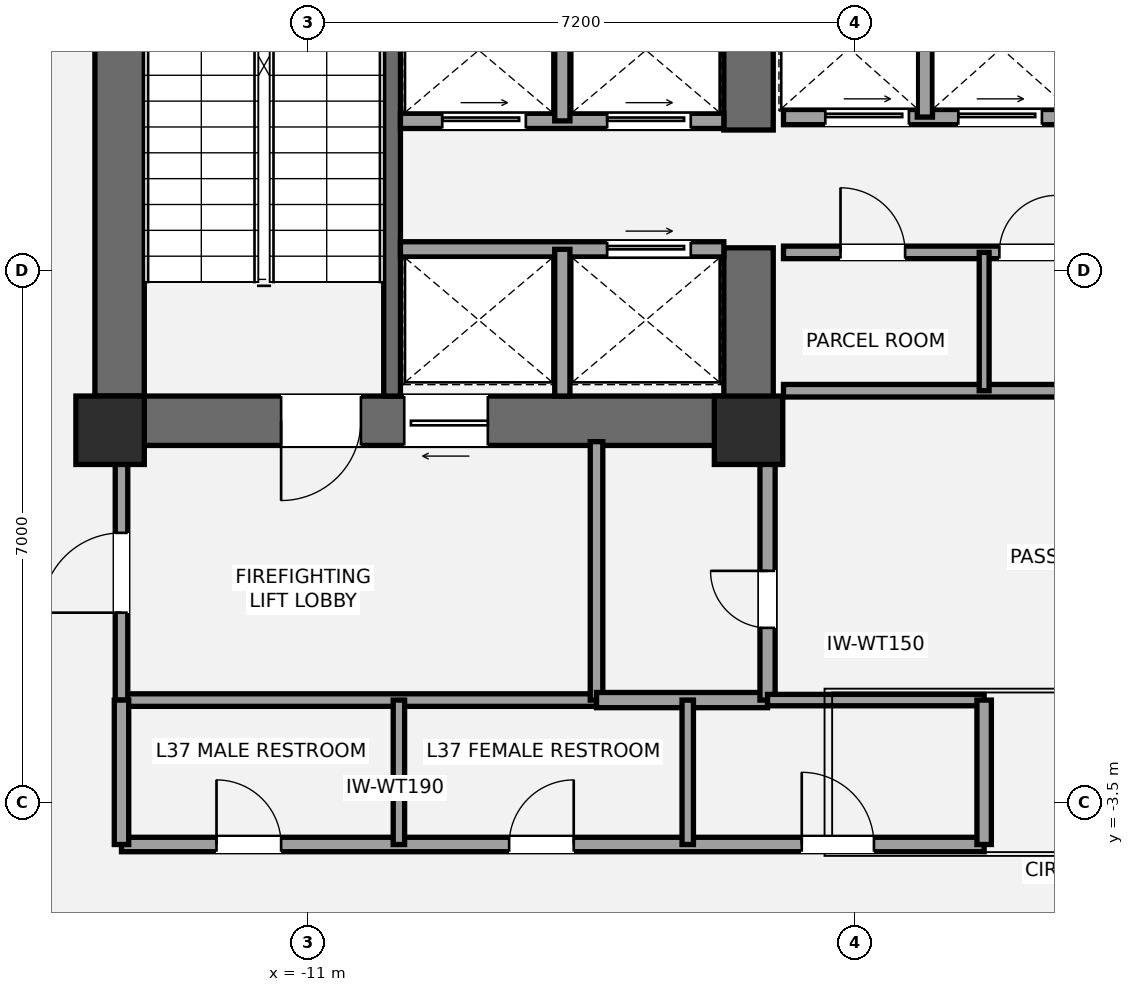
"""IFC4 building model, lengths in metres.
Left out: names, types, materials, properties, quantities, classifications, styles, units other than length and angle.
Written with IfcOpenShell. Run it as: python <this file> out.ifc"""

import sys

from ifc_helpers import new_model, si_unit, direction, frame, frame_2d, origin, origin_2d, place, context, subcontext, project, spatial, rectangle, extrude, element, fill, save


model = new_model("IFC4")
c1 = context("Model", 3, precision=1e-05, world=origin(), true_north=direction((0.0, 1.0)))
c2 = subcontext(c1, "Body", "Model", "MODEL_VIEW")
j1 = project(units=[si_unit("LENGTHUNIT", "METRE"), si_unit("PLANEANGLEUNIT", "RADIAN")], contexts=[c1])
p1 = place(None, origin())
s1 = spatial("IfcSite", under=j1, at=p1, CompositionType="ELEMENT")
p2 = place(p1, origin())
s2 = spatial("IfcBuilding", under=s1, at=p2, CompositionType="ELEMENT")
p3 = place(p2, frame((0.0, 0.0, 139.6)))
s3 = spatial("IfcBuildingStorey", under=s2, at=p3, CompositionType="ELEMENT", Elevation=139.6)
p4 = place(p3, frame((-13.475, 1.2, 0.0), z_axis=(0.0, 0.0, 1.0), x_axis=(0.0, 1.0, 0.0)))
e1 = element("IfcWall", 1, at=p4, inside=s3, PredefinedType="SHEAR", context=c2, shape_type="SweptSolid", body=[
    extrude(rectangle(XDim=8.45, YDim=0.65, at=frame_2d((4.225, 0.0))), origin(), (0.0, 0.0, 1.0), 4.2),
])
p5 = place(p3, frame((-4.875, 1.525, 0.0), z_axis=(0.0, 0.0, 1.0), x_axis=(-1.0, 0.0, 0.0)))
e2 = element("IfcWall", 2, at=p5, inside=s3, PredefinedType="SHEAR", context=c2, shape_type="SweptSolid", body=[
    extrude(rectangle(XDim=8.925, YDim=0.65, at=frame_2d((4.462, 0.0))), origin(), (0.0, 0.0, 1.0), 4.2),
])
p6 = place(p5, frame((5.425, 0.0, 0.0)))
e3 = element("IfcOpeningElement", 3, at=p6, cuts=e2, PredefinedType="OPENING", context=c2, shape_type="SweptSolid", body=[
    extrude(rectangle(XDim=1.05, YDim=2.15, at=frame_2d((0.525, 1.075))), frame((0.0, 0.335, 0.0), z_axis=(0.0, -1.0, 0.0), x_axis=(1.0, 0.0, 0.0)), (0.0, 0.0, 1.0), 0.67),
])
p7 = place(p5, frame((3.755, 0.0, 0.0)))
e4 = element("IfcOpeningElement", 4, at=p7, cuts=e2, PredefinedType="OPENING", context=c2, shape_type="SweptSolid", body=[
    extrude(rectangle(XDim=1.1, YDim=2.2, at=frame_2d((0.55, 1.1))), frame((0.0, 0.335, 0.0), z_axis=(0.0, -1.0, 0.0), x_axis=(1.0, 0.0, 0.0)), (0.0, 0.0, 1.0), 0.67),
])
p8 = place(p3, frame((-5.2, 1.2, 0.0), z_axis=(0.0, 0.0, 1.0), x_axis=(0.0, 1.0, 0.0)))
e5 = element("IfcWall", 5, at=p8, inside=s3, PredefinedType="SHEAR", context=c2, shape_type="SweptSolid", body=[
    extrude(rectangle(XDim=2.6, YDim=0.65, at=frame_2d((1.3, 0.0))), origin(), (0.0, 0.0, 1.0), 4.2),
])
p9 = place(p3, frame((-5.2, 5.35, 0.0), z_axis=(0.0, 0.0, 1.0), x_axis=(0.0, 1.0, 0.0)))
e6 = element("IfcWall", 6, at=p9, inside=s3, PredefinedType="SHEAR", context=c2, shape_type="SweptSolid", body=[
    extrude(rectangle(XDim=2.0, YDim=0.65, at=frame_2d((1.0, 0.0))), origin(), (0.0, 0.0, 1.0), 4.2),
])
p10 = place(p3, frame((-9.89, 1.85, 0.0), z_axis=(0.0, 0.0, 1.0), x_axis=(0.0, 1.0, 0.0)))
e7 = element("IfcWall", 7, at=p10, inside=s3, PredefinedType="SHEAR", context=c2, shape_type="SweptSolid", body=[
    extrude(rectangle(XDim=7.15, YDim=0.22, at=frame_2d((3.575, 0.0))), origin(), (0.0, 0.0, 1.0), 4.2),
])
for number, where, z_axis, x_axis in (
    (8, (-13.6, 1.4, 0.0), (0.0, 0.0, 1.0), (1.0, 0.0, 0.0)),
    (9, (-5.2, 1.4, 0.0), (0.0, 0.0, 1.0), (1.0, 0.0, 0.0)),
):
    element("IfcColumn", number, at=place(p3, frame(where, z_axis=z_axis, x_axis=x_axis)), inside=s3, PredefinedType="COLUMN", context=c2, shape_type="SweptSolid", body=[
        extrude(rectangle(XDim=0.9, YDim=0.9, at=origin_2d()), origin(), (0.0, 0.0, 1.0), 4.2),
    ])
p11 = place(p3, frame((-13.45, -2.15, 0.0), z_axis=(0.0, 0.0, 1.0), x_axis=(1.0, 0.0, 0.0)))
e10 = element("IfcWall", 10, at=p11, inside=s3, PredefinedType="PARTITIONING", context=c2, shape_type="SweptSolid", body=[
    extrude(rectangle(XDim=6.25, YDim=0.165, at=frame_2d((3.125, 0.0))), origin(), (0.0, 0.0, 1.0), 3.473),
])
p12 = place(p3, frame((-13.45, -2.15, 0.0), z_axis=(0.0, 0.0, 1.0), x_axis=(0.0, 1.0, 0.0)))
e11 = element("IfcWall", 11, at=p12, inside=s3, PredefinedType="PARTITIONING", context=c2, shape_type="SweptSolid", body=[
    extrude(rectangle(XDim=3.4, YDim=0.165, at=frame_2d((1.7, 0.0))), origin(), (0.0, 0.0, 1.0), 3.473),
])
p13 = place(p12, frame((1.15, 0.0, 0.0)))
e12 = element("IfcOpeningElement", 12, at=p13, cuts=e11, PredefinedType="OPENING", context=c2, shape_type="SweptSolid", body=[
    extrude(rectangle(XDim=1.05, YDim=2.15, at=frame_2d((0.525, 1.075))), frame((0.0, 0.093, 0.0), z_axis=(0.0, -1.0, 0.0), x_axis=(1.0, 0.0, 0.0)), (0.0, 0.0, 1.0), 0.185),
])
p14 = place(p3, frame((-7.2, -2.15, 0.0), z_axis=(0.0, 0.0, 1.0), x_axis=(0.0, 1.0, 0.0)))
e13 = element("IfcWall", 13, at=p14, inside=s3, PredefinedType="PARTITIONING", context=c2, shape_type="SweptSolid", body=[
    extrude(rectangle(XDim=3.4, YDim=0.165, at=frame_2d((1.7, 0.0))), origin(), (0.0, 0.0, 1.0), 3.473),
])
p15 = place(p3, frame((-7.2, -2.15, 0.0), z_axis=(0.0, 0.0, 1.0), x_axis=(1.0, 0.0, 0.0)))
e14 = element("IfcWall", 14, at=p15, inside=s3, PredefinedType="SOLIDWALL", context=c2, shape_type="SweptSolid", body=[
    extrude(rectangle(XDim=2.25, YDim=0.2, at=frame_2d((1.125, 0.0))), origin(), (0.0, 0.0, 1.0), 4.02),
])
p16 = place(p3, frame((-4.95, -2.15, 0.0), z_axis=(0.0, 0.0, 1.0), x_axis=(0.0, 1.0, 0.0)))
e15 = element("IfcWall", 15, at=p16, inside=s3, PredefinedType="SOLIDWALL", context=c2, shape_type="SweptSolid", body=[
    extrude(rectangle(XDim=3.4, YDim=0.2, at=frame_2d((1.7, 0.0))), origin(), (0.0, 0.0, 1.0), 3.473),
])
p17 = place(p16, frame((0.95, 0.0, 0.0)))
e16 = element("IfcOpeningElement", 16, at=p17, cuts=e15, PredefinedType="OPENING", context=c2, shape_type="SweptSolid", body=[
    extrude(rectangle(XDim=0.75, YDim=2.1, at=frame_2d((0.375, 1.05))), frame((0.0, 0.11, 0.0), z_axis=(0.0, -1.0, 0.0), x_axis=(1.0, 0.0, 0.0)), (0.0, 0.0, 1.0), 0.22),
])
p18 = place(p3, frame((-9.78, 3.78, 0.0), z_axis=(0.0, 0.0, 1.0), x_axis=(1.0, 0.0, 0.0)))
e17 = element("IfcWall", 17, at=p18, inside=s3, PredefinedType="SOLIDWALL", context=c2, shape_type="SweptSolid", body=[
    extrude(rectangle(XDim=4.255, YDim=0.2, at=frame_2d((2.127, 0.0))), origin(), (0.0, 0.0, 1.0), 4.02),
])
p19 = place(p18, frame((2.72, 0.0, 0.0)))
e18 = element("IfcOpeningElement", 18, at=p19, cuts=e17, PredefinedType="OPENING", context=c2, shape_type="SweptSolid", body=[
    extrude(rectangle(XDim=1.1, YDim=2.2, at=frame_2d((0.55, 1.1))), frame((0.0, 0.11, 0.0), z_axis=(0.0, -1.0, 0.0), x_axis=(1.0, 0.0, 0.0)), (0.0, 0.0, 1.0), 0.22),
])
p20 = place(p3, frame((-7.65, 1.85, 0.0), z_axis=(0.0, 0.0, 1.0), x_axis=(0.0, 1.0, 0.0)))
e19 = element("IfcWall", 19, at=p20, inside=s3, PredefinedType="SOLIDWALL", context=c2, shape_type="SweptSolid", body=[
    extrude(rectangle(XDim=1.93, YDim=0.2, at=frame_2d((0.965, 0.0))), origin(), (0.0, 0.0, 1.0), 4.02),
])
p21 = place(p3, frame((-9.78, 5.47, 0.0), z_axis=(0.0, 0.0, 1.0), x_axis=(1.0, 0.0, 0.0)))
e20 = element("IfcWall", 20, at=p21, inside=s3, PredefinedType="SOLIDWALL", context=c2, shape_type="SweptSolid", body=[
    extrude(rectangle(XDim=4.255, YDim=0.2, at=frame_2d((2.127, 0.0))), origin(), (0.0, 0.0, 1.0), 4.02),
])
p22 = place(p21, frame((0.55, 0.0, 0.0)))
e21 = element("IfcOpeningElement", 21, at=p22, cuts=e20, PredefinedType="OPENING", context=c2, shape_type="SweptSolid", body=[
    extrude(rectangle(XDim=1.1, YDim=2.2, at=frame_2d((0.55, 1.1))), frame((0.0, 0.11, 0.0), z_axis=(0.0, -1.0, 0.0), x_axis=(1.0, 0.0, 0.0)), (0.0, 0.0, 1.0), 0.22),
])
p23 = place(p21, frame((2.72, 0.0, 0.0)))
e22 = element("IfcOpeningElement", 22, at=p23, cuts=e20, PredefinedType="OPENING", context=c2, shape_type="SweptSolid", body=[
    extrude(rectangle(XDim=1.1, YDim=2.2, at=frame_2d((0.55, 1.1))), frame((0.0, 0.11, 0.0), z_axis=(0.0, -1.0, 0.0), x_axis=(1.0, 0.0, 0.0)), (0.0, 0.0, 1.0), 0.22),
])
p24 = place(p3, frame((-7.65, 5.47, 0.0), z_axis=(0.0, 0.0, 1.0), x_axis=(0.0, 1.0, 0.0)))
e23 = element("IfcWall", 23, at=p24, inside=s3, PredefinedType="SOLIDWALL", context=c2, shape_type="SweptSolid", body=[
    extrude(rectangle(XDim=1.86, YDim=0.2, at=frame_2d((0.93, 0.0))), origin(), (0.0, 0.0, 1.0), 4.02),
])
p25 = place(p3, frame((-4.74, 1.92, 0.0), z_axis=(0.0, 0.0, 1.0), x_axis=(1.0, 0.0, 0.0)))
e24 = element("IfcWall", 24, at=p25, inside=s3, PredefinedType="PARTITIONING", context=c2, shape_type="SweptSolid", body=[
    extrude(rectangle(XDim=3.89, YDim=0.165, at=frame_2d((1.945, 0.0))), origin(), (0.0, 0.0, 1.0), 3.16),
])
p26 = place(p3, frame((-4.74, 3.74, 0.0), z_axis=(0.0, 0.0, 1.0), x_axis=(1.0, 0.0, 0.0)))
e25 = element("IfcWall", 25, at=p26, inside=s3, PredefinedType="PARTITIONING", context=c2, shape_type="SweptSolid", body=[
    extrude(rectangle(XDim=3.89, YDim=0.165, at=frame_2d((1.945, 0.0))), origin(), (0.0, 0.0, 1.0), 4.02),
])
p27 = place(p26, frame((0.75, 0.0, 0.0)))
e26 = element("IfcOpeningElement", 26, at=p27, cuts=e25, PredefinedType="OPENING", context=c2, shape_type="SweptSolid", body=[
    extrude(rectangle(XDim=0.85, YDim=2.1, at=frame_2d((0.425, 1.05))), frame((0.0, 0.093, 0.0), z_axis=(0.0, -1.0, 0.0), x_axis=(1.0, 0.0, 0.0)), (0.0, 0.0, 1.0), 0.185),
])
p28 = place(p26, frame((2.84, 0.0, 0.0)))
e27 = element("IfcOpeningElement", 27, at=p28, cuts=e25, PredefinedType="OPENING", context=c2, shape_type="SweptSolid", body=[
    extrude(rectangle(XDim=0.75, YDim=2.1, at=frame_2d((0.375, 1.05))), frame((0.0, 0.093, 0.0), z_axis=(0.0, -1.0, 0.0), x_axis=(1.0, 0.0, 0.0)), (0.0, 0.0, 1.0), 0.185),
])
p29 = place(p3, frame((-2.1, 1.92, 0.0), z_axis=(0.0, 0.0, 1.0), x_axis=(0.0, 1.0, 0.0)))
e28 = element("IfcWall", 28, at=p29, inside=s3, PredefinedType="PARTITIONING", context=c2, shape_type="SweptSolid", body=[
    extrude(rectangle(XDim=1.82, YDim=0.13, at=frame_2d((0.91, 0.0))), origin(), (0.0, 0.0, 1.0), 4.02),
])
p30 = place(p3, frame((-4.74, 5.52, 0.0), z_axis=(0.0, 0.0, 1.0), x_axis=(1.0, 0.0, 0.0)))
e29 = element("IfcWall", 29, at=p30, inside=s3, PredefinedType="SOLIDWALL", context=c2, shape_type="SweptSolid", body=[
    extrude(rectangle(XDim=3.86, YDim=0.2, at=frame_2d((1.93, 0.0))), origin(), (0.0, 0.0, 1.0), 4.02),
])
p31 = place(p30, frame((0.55, 0.0, 0.0)))
e30 = element("IfcOpeningElement", 30, at=p31, cuts=e29, PredefinedType="OPENING", context=c2, shape_type="SweptSolid", body=[
    extrude(rectangle(XDim=1.1, YDim=2.2, at=frame_2d((0.55, 1.1))), frame((0.0, 0.11, 0.0), z_axis=(0.0, -1.0, 0.0), x_axis=(1.0, 0.0, 0.0)), (0.0, 0.0, 1.0), 0.22),
])
p32 = place(p30, frame((2.3, 0.0, 0.0)))
e31 = element("IfcOpeningElement", 31, at=p32, cuts=e29, PredefinedType="OPENING", context=c2, shape_type="SweptSolid", body=[
    extrude(rectangle(XDim=1.1, YDim=2.2, at=frame_2d((0.55, 1.1))), frame((0.0, 0.11, 0.0), z_axis=(0.0, -1.0, 0.0), x_axis=(1.0, 0.0, 0.0)), (0.0, 0.0, 1.0), 0.22),
])
p33 = place(p3, frame((-2.88, 5.52, 0.0), z_axis=(0.0, 0.0, 1.0), x_axis=(0.0, 1.0, 0.0)))
e32 = element("IfcWall", 32, at=p33, inside=s3, PredefinedType="SOLIDWALL", context=c2, shape_type="SweptSolid", body=[
    extrude(rectangle(XDim=1.81, YDim=0.2, at=frame_2d((0.905, 0.0))), origin(), (0.0, 0.0, 1.0), 4.02),
])
p34 = place(p3, frame((-13.45, -4.05, 0.0), z_axis=(0.0, 0.0, 1.0), x_axis=(1.0, 0.0, 0.0)))
e33 = element("IfcWall", 33, at=p34, inside=s3, PredefinedType="PLUMBINGWALL", context=c2, shape_type="SweptSolid", body=[
    extrude(rectangle(XDim=11.35, YDim=0.19, at=frame_2d((5.675, 0.0))), origin(), (0.0, 0.0, 1.0), 4.02),
])
p35 = place(p34, frame((1.25, 0.0, 0.0)))
e34 = element("IfcOpeningElement", 34, at=p35, cuts=e33, PredefinedType="OPENING", context=c2, shape_type="SweptSolid", body=[
    extrude(rectangle(XDim=0.85, YDim=2.1, at=frame_2d((0.425, 1.05))), frame((0.0, 0.105, 0.0), z_axis=(0.0, -1.0, 0.0), x_axis=(1.0, 0.0, 0.0)), (0.0, 0.0, 1.0), 0.21),
])
p36 = place(p34, frame((5.1, 0.0, 0.0)))
e35 = element("IfcOpeningElement", 35, at=p36, cuts=e33, PredefinedType="OPENING", context=c2, shape_type="SweptSolid", body=[
    extrude(rectangle(XDim=0.85, YDim=2.1, at=frame_2d((0.425, 1.05))), frame((0.0, 0.105, 0.0), z_axis=(0.0, -1.0, 0.0), x_axis=(1.0, 0.0, 0.0)), (0.0, 0.0, 1.0), 0.21),
])
p37 = place(p34, frame((8.95, 0.0, 0.0)))
e36 = element("IfcOpeningElement", 36, at=p37, cuts=e33, PredefinedType="OPENING", context=c2, shape_type="SweptSolid", body=[
    extrude(rectangle(XDim=0.95, YDim=2.15, at=frame_2d((0.475, 1.075))), frame((0.0, 0.105, 0.0), z_axis=(0.0, -1.0, 0.0), x_axis=(1.0, 0.0, 0.0)), (0.0, 0.0, 1.0), 0.21),
])
p38 = place(p3, frame((-4.95, -2.15, 0.0), z_axis=(0.0, 0.0, 1.0), x_axis=(1.0, 0.0, 0.0)))
e37 = element("IfcWall", 37, at=p38, inside=s3, PredefinedType="PLUMBINGWALL", context=c2, shape_type="SweptSolid", body=[
    extrude(rectangle(XDim=2.85, YDim=0.15, at=frame_2d((1.425, 0.0))), origin(), (0.0, 0.0, 1.0), 4.02),
])
p39 = place(p3, frame((-13.45, -4.05, 0.0), z_axis=(0.0, 0.0, 1.0), x_axis=(0.0, 1.0, 0.0)))
e38 = element("IfcWall", 38, at=p39, inside=s3, PredefinedType="PLUMBINGWALL", context=c2, shape_type="SweptSolid", body=[
    extrude(rectangle(XDim=1.9, YDim=0.19, at=frame_2d((0.95, 0.0))), origin(), (0.0, 0.0, 1.0), 3.473),
])
p40 = place(p3, frame((-2.1, -4.05, 0.0), z_axis=(0.0, 0.0, 1.0), x_axis=(0.0, 1.0, 0.0)))
e39 = element("IfcWall", 39, at=p40, inside=s3, PredefinedType="PLUMBINGWALL", context=c2, shape_type="SweptSolid", body=[
    extrude(rectangle(XDim=1.9, YDim=0.19, at=frame_2d((0.95, 0.0))), origin(), (0.0, 0.0, 1.0), 4.02),
])
p41 = place(p3, frame((-9.8, -4.05, 0.0), z_axis=(0.0, 0.0, 1.0), x_axis=(0.0, 1.0, 0.0)))
e40 = element("IfcWall", 40, at=p41, inside=s3, PredefinedType="PLUMBINGWALL", context=c2, shape_type="SweptSolid", body=[
    extrude(rectangle(XDim=1.9, YDim=0.15, at=frame_2d((0.95, 0.0))), origin(), (0.0, 0.0, 1.0), 4.02),
])
p42 = place(p3, frame((-6.0, -4.05, 0.0), z_axis=(0.0, 0.0, 1.0), x_axis=(0.0, 1.0, 0.0)))
e41 = element("IfcWall", 41, at=p42, inside=s3, PredefinedType="PLUMBINGWALL", context=c2, shape_type="SweptSolid", body=[
    extrude(rectangle(XDim=1.9, YDim=0.15, at=frame_2d((0.95, 0.0))), origin(), (0.0, 0.0, 1.0), 3.473),
])
p43 = place(p6, origin())
e42 = element("IfcDoor", 42, at=p43, inside=s3, OperationType="SINGLE_SWING_RIGHT", PredefinedType="DOOR", context=c2, shape_type="SweptSolid", body=[
    extrude(rectangle(XDim=1.05, YDim=2.15, at=frame_2d((0.525, 1.075))), frame((0.0, 0.025, 0.0), z_axis=(0.0, -1.0, 0.0), x_axis=(1.0, 0.0, 0.0)), (0.0, 0.0, 1.0), 0.05),
])
fill(e3, e42)
p44 = place(p13, origin())
e43 = element("IfcDoor", 43, at=p44, inside=s3, OperationType="SINGLE_SWING_LEFT", PredefinedType="DOOR", context=c2, shape_type="SweptSolid", body=[
    extrude(rectangle(XDim=1.05, YDim=2.15, at=frame_2d((0.525, 1.075))), frame((0.0, 0.025, 0.0), z_axis=(0.0, -1.0, 0.0), x_axis=(1.0, 0.0, 0.0)), (0.0, 0.0, 1.0), 0.05),
])
fill(e12, e43)
p45 = place(p17, origin())
e44 = element("IfcDoor", 44, at=p45, inside=s3, OperationType="SINGLE_SWING_RIGHT", PredefinedType="DOOR", context=c2, shape_type="SweptSolid", body=[
    extrude(rectangle(XDim=0.75, YDim=2.1, at=frame_2d((0.375, 1.05))), frame((0.0, 0.025, 0.0), z_axis=(0.0, -1.0, 0.0), x_axis=(1.0, 0.0, 0.0)), (0.0, 0.0, 1.0), 0.05),
])
fill(e16, e44)
p46 = place(p7, origin())
e45 = element("IfcDoor", 45, at=p46, inside=s3, OperationType="SLIDING_TO_LEFT", PredefinedType="DOOR", context=c2, shape_type="SweptSolid", body=[
    extrude(rectangle(XDim=1.1, YDim=2.2, at=frame_2d((0.55, 1.1))), frame((0.0, 0.025, 0.0), z_axis=(0.0, -1.0, 0.0), x_axis=(1.0, 0.0, 0.0)), (0.0, 0.0, 1.0), 0.05),
])
fill(e4, e45)
p47 = place(p22, origin())
e46 = element("IfcDoor", 46, at=p47, inside=s3, OperationType="SLIDING_TO_LEFT", PredefinedType="DOOR", context=c2, shape_type="SweptSolid", body=[
    extrude(rectangle(XDim=1.1, YDim=2.2, at=frame_2d((0.55, 1.1))), frame((0.0, 0.025, 0.0), z_axis=(0.0, -1.0, 0.0), x_axis=(1.0, 0.0, 0.0)), (0.0, 0.0, 1.0), 0.05),
])
fill(e21, e46)
p48 = place(p23, origin())
e47 = element("IfcDoor", 47, at=p48, inside=s3, OperationType="SLIDING_TO_LEFT", PredefinedType="DOOR", context=c2, shape_type="SweptSolid", body=[
    extrude(rectangle(XDim=1.1, YDim=2.2, at=frame_2d((0.55, 1.1))), frame((0.0, 0.025, 0.0), z_axis=(0.0, -1.0, 0.0), x_axis=(1.0, 0.0, 0.0)), (0.0, 0.0, 1.0), 0.05),
])
fill(e22, e47)
p49 = place(p19, origin())
e48 = element("IfcDoor", 48, at=p49, inside=s3, OperationType="SLIDING_TO_LEFT", PredefinedType="DOOR", context=c2, shape_type="SweptSolid", body=[
    extrude(rectangle(XDim=1.1, YDim=2.2, at=frame_2d((0.55, 1.1))), frame((0.0, 0.025, 0.0), z_axis=(0.0, -1.0, 0.0), x_axis=(1.0, 0.0, 0.0)), (0.0, 0.0, 1.0), 0.05),
])
fill(e18, e48)
p50 = place(p27, origin())
e49 = element("IfcDoor", 49, at=p50, inside=s3, OperationType="SINGLE_SWING_LEFT", PredefinedType="DOOR", context=c2, shape_type="SweptSolid", body=[
    extrude(rectangle(XDim=0.85, YDim=2.1, at=frame_2d((0.425, 1.05))), frame((0.0, 0.025, 0.0), z_axis=(0.0, -1.0, 0.0), x_axis=(1.0, 0.0, 0.0)), (0.0, 0.0, 1.0), 0.05),
])
fill(e26, e49)
p51 = place(p28, origin())
e50 = element("IfcDoor", 50, at=p51, inside=s3, OperationType="SINGLE_SWING_RIGHT", PredefinedType="DOOR", context=c2, shape_type="SweptSolid", body=[
    extrude(rectangle(XDim=0.75, YDim=2.1, at=frame_2d((0.375, 1.05))), frame((0.0, 0.025, 0.0), z_axis=(0.0, -1.0, 0.0), x_axis=(1.0, 0.0, 0.0)), (0.0, 0.0, 1.0), 0.05),
])
fill(e27, e50)
p52 = place(p31, origin())
e51 = element("IfcDoor", 51, at=p52, inside=s3, OperationType="SLIDING_TO_LEFT", PredefinedType="DOOR", context=c2, shape_type="SweptSolid", body=[
    extrude(rectangle(XDim=1.1, YDim=2.2, at=frame_2d((0.55, 1.1))), frame((0.0, 0.025, 0.0), z_axis=(0.0, -1.0, 0.0), x_axis=(1.0, 0.0, 0.0)), (0.0, 0.0, 1.0), 0.05),
])
fill(e30, e51)
p53 = place(p32, origin())
e52 = element("IfcDoor", 52, at=p53, inside=s3, OperationType="SLIDING_TO_LEFT", PredefinedType="DOOR", context=c2, shape_type="SweptSolid", body=[
    extrude(rectangle(XDim=1.1, YDim=2.2, at=frame_2d((0.55, 1.1))), frame((0.0, 0.025, 0.0), z_axis=(0.0, -1.0, 0.0), x_axis=(1.0, 0.0, 0.0)), (0.0, 0.0, 1.0), 0.05),
])
fill(e31, e52)
p54 = place(p35, origin())
e53 = element("IfcDoor", 53, at=p54, inside=s3, OperationType="SINGLE_SWING_LEFT", PredefinedType="DOOR", context=c2, shape_type="SweptSolid", body=[
    extrude(rectangle(XDim=0.85, YDim=2.1, at=frame_2d((0.425, 1.05))), frame((0.0, 0.025, 0.0), z_axis=(0.0, -1.0, 0.0), x_axis=(1.0, 0.0, 0.0)), (0.0, 0.0, 1.0), 0.05),
])
fill(e34, e53)
p55 = place(p36, origin())
e54 = element("IfcDoor", 54, at=p55, inside=s3, OperationType="SINGLE_SWING_RIGHT", PredefinedType="DOOR", context=c2, shape_type="SweptSolid", body=[
    extrude(rectangle(XDim=0.85, YDim=2.1, at=frame_2d((0.425, 1.05))), frame((0.0, 0.025, 0.0), z_axis=(0.0, -1.0, 0.0), x_axis=(1.0, 0.0, 0.0)), (0.0, 0.0, 1.0), 0.05),
])
fill(e35, e54)
p56 = place(p37, origin())
e55 = element("IfcDoor", 55, at=p56, inside=s3, OperationType="SINGLE_SWING_LEFT", PredefinedType="DOOR", context=c2, shape_type="SweptSolid", body=[
    extrude(rectangle(XDim=0.95, YDim=2.15, at=frame_2d((0.475, 1.075))), frame((0.0, 0.025, 0.0), z_axis=(0.0, -1.0, 0.0), x_axis=(1.0, 0.0, 0.0)), (0.0, 0.0, 1.0), 0.05),
])
fill(e36, e55)
save(model, sys.argv[1])
